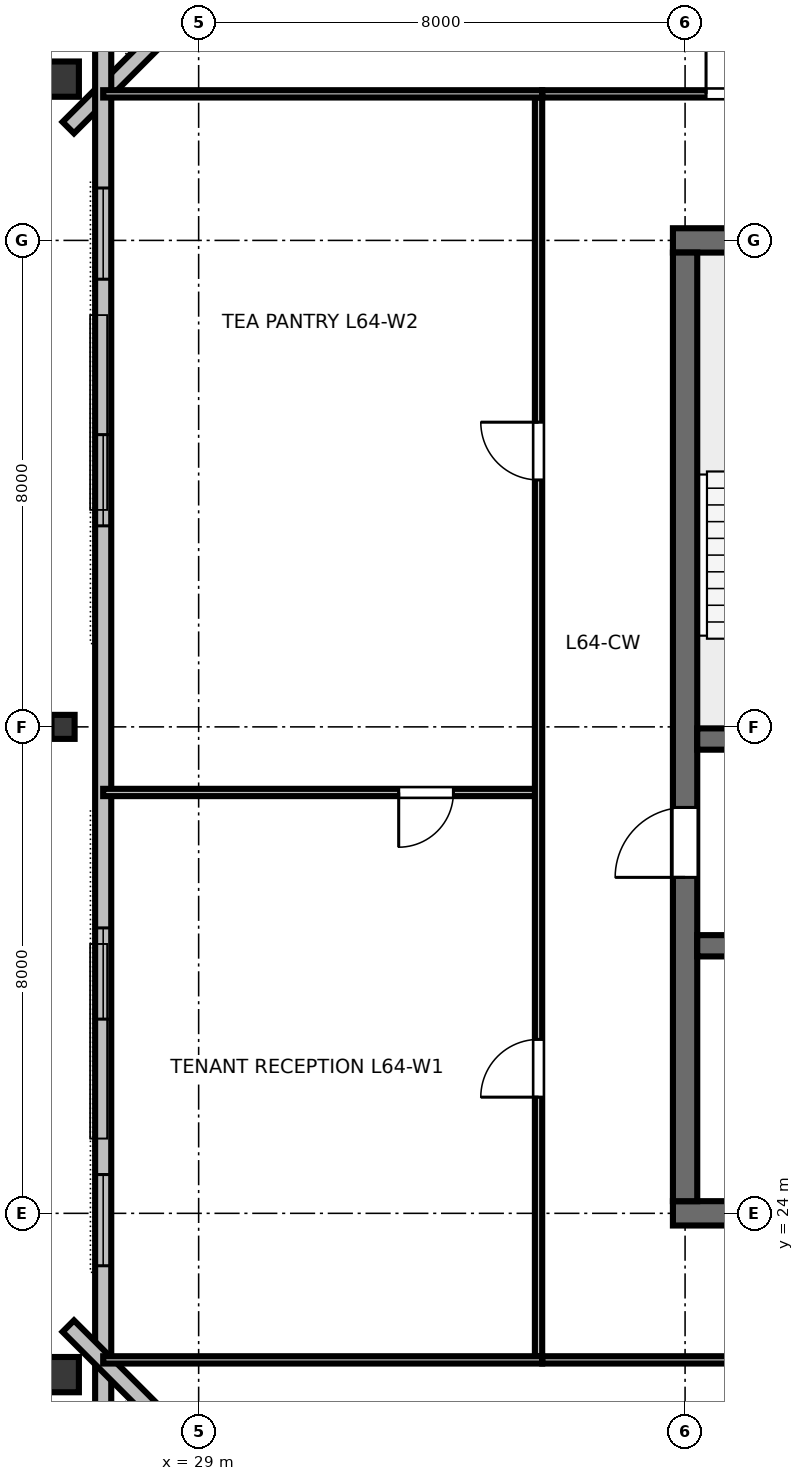
"""IFC4 building model, lengths in metres.
Left out: names, types, materials, properties, quantities, classifications, styles, units other than length and angle.
Written with IfcOpenShell. Run it as: python <this file> out.ifc"""

import sys

from ifc_helpers import new_model, si_unit, direction, frame, frame_2d, origin, origin_2d, place, context, subcontext, project, spatial, rectangle, hollow_rectangle, i_section, extrude, element, fill, save


model = new_model("IFC4")
c1 = context("Model", 3, precision=1e-05, world=origin(), true_north=direction((0.0, 1.0)))
c2 = subcontext(c1, "Body", "Model", "MODEL_VIEW")
j1 = project(units=[si_unit("LENGTHUNIT", "METRE"), si_unit("PLANEANGLEUNIT", "RADIAN")], contexts=[c1])
p1 = place(None, origin())
s1 = spatial("IfcSite", under=j1, at=p1, CompositionType="ELEMENT")
p2 = place(p1, origin())
s2 = spatial("IfcBuilding", under=s1, at=p2, CompositionType="ELEMENT")
p3 = place(p2, frame((0.0, 0.0, 243.0)))
s3 = spatial("IfcBuildingStorey", under=s2, at=p3, CompositionType="ELEMENT", Elevation=243.0)
p4 = place(p3, frame((36.8, 24.0, 0.0), z_axis=(0.0, 0.0, 1.0), x_axis=(1.0, 0.0, 0.0)))
e1 = element("IfcWall", 1, at=p4, inside=s3, PredefinedType="SHEAR", context=c2, shape_type="SweptSolid", body=[
    extrude(rectangle(XDim=18.4, YDim=0.4, at=frame_2d((9.2, 0.0))), origin(), (0.0, 0.0, 1.0), 3.36),
])
p5 = place(p4, frame((13.4, 0.0, 0.0)))
e2 = element("IfcOpeningElement", 2, at=p5, cuts=e1, PredefinedType="OPENING", context=c2, shape_type="SweptSolid", body=[
    extrude(rectangle(XDim=1.6, YDim=2.15, at=frame_2d((0.8, 1.075))), frame((0.0, 0.21, 0.0), z_axis=(0.0, -1.0, 0.0), x_axis=(1.0, 0.0, 0.0)), (0.0, 0.0, 1.0), 0.42),
])
p6 = place(p3, frame((36.8, 40.0, 0.0), z_axis=(0.0, 0.0, 1.0), x_axis=(1.0, 0.0, 0.0)))
e3 = element("IfcWall", 3, at=p6, inside=s3, PredefinedType="SHEAR", context=c2, shape_type="SweptSolid", body=[
    extrude(rectangle(XDim=18.4, YDim=0.4, at=frame_2d((9.2, 0.0))), origin(), (0.0, 0.0, 1.0), 3.36),
])
p7 = place(p6, frame((10.5, 0.0, 0.0)))
e4 = element("IfcOpeningElement", 4, at=p7, cuts=e3, PredefinedType="OPENING", context=c2, shape_type="SweptSolid", body=[
    extrude(rectangle(XDim=1.0, YDim=2.15, at=frame_2d((0.5, 1.075))), frame((0.0, 0.21, 0.0), z_axis=(0.0, -1.0, 0.0), x_axis=(1.0, 0.0, 0.0)), (0.0, 0.0, 1.0), 0.42),
])
p8 = place(p3, frame((37.0, 24.2, 0.0), z_axis=(0.0, 0.0, 1.0), x_axis=(0.0, 1.0, 0.0)))
e5 = element("IfcWall", 5, at=p8, inside=s3, PredefinedType="SHEAR", context=c2, shape_type="SweptSolid", body=[
    extrude(rectangle(XDim=15.6, YDim=0.4, at=frame_2d((7.8, 0.0))), origin(), (0.0, 0.0, 1.0), 3.36),
])
p9 = place(p8, frame((5.325, 0.0, 0.0)))
e6 = element("IfcOpeningElement", 6, at=p9, cuts=e5, PredefinedType="OPENING", context=c2, shape_type="SweptSolid", body=[
    extrude(rectangle(XDim=1.15, YDim=2.15, at=frame_2d((0.575, 1.075))), frame((0.0, 0.21, 0.0), z_axis=(0.0, -1.0, 0.0), x_axis=(1.0, 0.0, 0.0)), (0.0, 0.0, 1.0), 0.42),
])
p10 = place(p3, frame((37.2, 31.8, 0.0), z_axis=(0.0, 0.0, 1.0), x_axis=(1.0, 0.0, 0.0)))
e7 = element("IfcWall", 7, at=p10, inside=s3, PredefinedType="SHEAR", context=c2, shape_type="SweptSolid", body=[
    extrude(rectangle(XDim=17.6, YDim=0.35, at=frame_2d((8.8, 0.0))), origin(), (0.0, 0.0, 1.0), 3.36),
])
p11 = place(p10, frame((0.85, 0.0, 0.0)))
e8 = element("IfcOpeningElement", 8, at=p11, cuts=e7, PredefinedType="OPENING", context=c2, shape_type="SweptSolid", body=[
    extrude(rectangle(XDim=1.1, YDim=2.15, at=frame_2d((0.55, 1.075))), frame((0.0, 0.185, 0.0), z_axis=(0.0, -1.0, 0.0), x_axis=(1.0, 0.0, 0.0)), (0.0, 0.0, 1.0), 0.37),
])
p12 = place(p10, frame((14.75, 0.0, 0.0)))
e9 = element("IfcOpeningElement", 9, at=p12, cuts=e7, PredefinedType="OPENING", context=c2, shape_type="SweptSolid", body=[
    extrude(rectangle(XDim=1.1, YDim=2.15, at=frame_2d((0.55, 1.075))), frame((0.0, 0.185, 0.0), z_axis=(0.0, -1.0, 0.0), x_axis=(1.0, 0.0, 0.0)), (0.0, 0.0, 1.0), 0.37),
])
p13 = place(p3, frame((37.2, 28.4, 0.0), z_axis=(0.0, 0.0, 1.0), x_axis=(1.0, 0.0, 0.0)))
e10 = element("IfcWall", 10, at=p13, inside=s3, PredefinedType="SHEAR", context=c2, shape_type="SweptSolid", body=[
    extrude(rectangle(XDim=17.6, YDim=0.35, at=frame_2d((8.8, 0.0))), origin(), (0.0, 0.0, 1.0), 3.36),
])
p14 = place(p3, frame((26.68, 42.652, 0.0), z_axis=(0.0, 0.0, 1.0), x_axis=(0.0, 1.0, 0.0)))
e11 = element("IfcColumn", 11, at=p14, inside=s3, PredefinedType="COLUMN", context=c2, shape_type="SweptSolid", body=[
    extrude(hollow_rectangle(XDim=0.58, YDim=0.7, WallThickness=0.032, at=origin_2d()), origin(), (0.0, 0.0, 1.0), 3.373),
])
p15 = place(p3, frame((26.77, 32.0, 0.0), z_axis=(0.0, 0.0, 1.0), x_axis=(0.0, 1.0, 0.0)))
e12 = element("IfcColumn", 12, at=p15, inside=s3, PredefinedType="COLUMN", context=c2, shape_type="SweptSolid", body=[
    extrude(i_section(OverallWidth=0.395, OverallDepth=0.38, WebThickness=0.019, FlangeThickness=0.03, FilletRadius=0.025, at=origin_2d()), origin(), (0.0, 0.0, 1.0), 3.373),
])
p16 = place(p3, frame((26.68, 21.348, 0.0), z_axis=(0.0, 0.0, 1.0), x_axis=(0.0, 1.0, 0.0)))
e13 = element("IfcColumn", 13, at=p16, inside=s3, PredefinedType="COLUMN", context=c2, shape_type="SweptSolid", body=[
    extrude(hollow_rectangle(XDim=0.58, YDim=0.7, WallThickness=0.032, at=origin_2d()), origin(), (0.0, 0.0, 1.0), 3.373),
])
p17 = place(p3, frame((34.396, 49.394, 0.0), z_axis=(0.0, 0.0, 1.0), x_axis=(-0.707106781187, -0.707106781187, 0.0)))
e14 = element("IfcWall", 14, at=p17, inside=s3, PredefinedType="STANDARD", context=c2, shape_type="SweptSolid", body=[
    extrude(rectangle(XDim=10.662, YDim=0.265, at=frame_2d((5.331, 0.0))), origin(), (0.0, 0.0, 1.0), 3.375),
])
p18 = place(p3, frame((27.43, 43.24, 0.0), z_axis=(0.0, 0.0, 1.0), x_axis=(0.0, -1.0, 0.0)))
e15 = element("IfcWall", 15, at=p18, inside=s3, PredefinedType="STANDARD", context=c2, shape_type="SweptSolid", body=[
    extrude(rectangle(XDim=22.48, YDim=0.265, at=frame_2d((11.24, 0.0))), origin(), (0.0, 0.0, 1.0), 3.375),
])
p19 = place(p18, frame((2.378, 0.0, 0.85)))
e16 = element("IfcOpeningElement", 16, at=p19, cuts=e15, PredefinedType="OPENING", context=c2, shape_type="SweptSolid", body=[
    extrude(rectangle(XDim=1.5, YDim=1.85, at=frame_2d((0.75, 0.925))), frame((0.0, 0.142, 0.0), z_axis=(0.0, -1.0, 0.0), x_axis=(1.0, 0.0, 0.0)), (0.0, 0.0, 1.0), 0.285),
])
p20 = place(p18, frame((6.434, 0.0, 0.85)))
e17 = element("IfcOpeningElement", 17, at=p20, cuts=e15, PredefinedType="OPENING", context=c2, shape_type="SweptSolid", body=[
    extrude(rectangle(XDim=1.5, YDim=1.85, at=frame_2d((0.75, 0.925))), frame((0.0, 0.142, 0.0), z_axis=(0.0, -1.0, 0.0), x_axis=(1.0, 0.0, 0.0)), (0.0, 0.0, 1.0), 0.285),
])
p21 = place(p18, frame((14.546, 0.0, 0.85)))
e18 = element("IfcOpeningElement", 18, at=p21, cuts=e15, PredefinedType="OPENING", context=c2, shape_type="SweptSolid", body=[
    extrude(rectangle(XDim=1.5, YDim=1.85, at=frame_2d((0.75, 0.925))), frame((0.0, 0.142, 0.0), z_axis=(0.0, -1.0, 0.0), x_axis=(1.0, 0.0, 0.0)), (0.0, 0.0, 1.0), 0.285),
])
p22 = place(p18, frame((18.602, 0.0, 0.85)))
e19 = element("IfcOpeningElement", 19, at=p22, cuts=e15, PredefinedType="OPENING", context=c2, shape_type="SweptSolid", body=[
    extrude(rectangle(XDim=1.5, YDim=1.85, at=frame_2d((0.75, 0.925))), frame((0.0, 0.142, 0.0), z_axis=(0.0, -1.0, 0.0), x_axis=(1.0, 0.0, 0.0)), (0.0, 0.0, 1.0), 0.285),
])
p23 = place(p3, frame((26.856, 22.146, 0.0), z_axis=(0.0, 0.0, 1.0), x_axis=(0.707106781187, -0.707106781187, 0.0)))
e20 = element("IfcWall", 20, at=p23, inside=s3, PredefinedType="STANDARD", context=c2, shape_type="SweptSolid", body=[
    extrude(rectangle(XDim=10.662, YDim=0.265, at=frame_2d((5.331, 0.0))), origin(), (0.0, 0.0, 1.0), 3.375),
])
p24 = place(p3, frame((34.65, 21.59, 0.0), z_axis=(0.0, 0.0, 1.0), x_axis=(1.0, 0.0, 0.0)))
e21 = element("IfcWall", 21, at=p24, inside=s3, PredefinedType="PARTITIONING", context=c2, shape_type="SweptSolid", body=[
    extrude(rectangle(XDim=10.33, YDim=0.12, at=frame_2d((5.165, 0.0))), origin(), (0.0, 0.0, 1.0), 2.655),
])
p25 = place(p24, frame((3.55, 0.0, 0.0)))
e22 = element("IfcOpeningElement", 22, at=p25, cuts=e21, PredefinedType="OPENING", context=c2, shape_type="SweptSolid", body=[
    extrude(rectangle(XDim=0.95, YDim=2.15, at=frame_2d((0.475, 1.075))), frame((0.0, 0.07, 0.0), z_axis=(0.0, -1.0, 0.0), x_axis=(1.0, 0.0, 0.0)), (0.0, 0.0, 1.0), 0.14),
])
p26 = place(p24, frame((8.645, 0.0, 0.0)))
e23 = element("IfcOpeningElement", 23, at=p26, cuts=e21, PredefinedType="OPENING", context=c2, shape_type="SweptSolid", body=[
    extrude(rectangle(XDim=0.95, YDim=2.15, at=frame_2d((0.475, 1.075))), frame((0.0, 0.07, 0.0), z_axis=(0.0, -1.0, 0.0), x_axis=(1.0, 0.0, 0.0)), (0.0, 0.0, 1.0), 0.14),
])
p27 = place(p3, frame((34.65, 42.41, 0.0), z_axis=(0.0, 0.0, 1.0), x_axis=(1.0, 0.0, 0.0)))
e24 = element("IfcWall", 24, at=p27, inside=s3, PredefinedType="PARTITIONING", context=c2, shape_type="SweptSolid", body=[
    extrude(rectangle(XDim=10.33, YDim=0.12, at=frame_2d((5.165, 0.0))), origin(), (0.0, 0.0, 1.0), 2.655),
])
p28 = place(p27, frame((2.695, 0.0, 0.0)))
e25 = element("IfcOpeningElement", 25, at=p28, cuts=e24, PredefinedType="OPENING", context=c2, shape_type="SweptSolid", body=[
    extrude(rectangle(XDim=0.95, YDim=2.15, at=frame_2d((0.475, 1.075))), frame((0.0, 0.07, 0.0), z_axis=(0.0, -1.0, 0.0), x_axis=(1.0, 0.0, 0.0)), (0.0, 0.0, 1.0), 0.14),
])
p29 = place(p27, frame((7.79, 0.0, 0.0)))
e26 = element("IfcOpeningElement", 26, at=p29, cuts=e24, PredefinedType="OPENING", context=c2, shape_type="SweptSolid", body=[
    extrude(rectangle(XDim=0.95, YDim=2.15, at=frame_2d((0.475, 1.075))), frame((0.0, 0.07, 0.0), z_axis=(0.0, -1.0, 0.0), x_axis=(1.0, 0.0, 0.0)), (0.0, 0.0, 1.0), 0.14),
])
p30 = place(p3, frame((34.59, 30.921, 0.0), z_axis=(0.0, 0.0, 1.0), x_axis=(-1.0, 0.0, 0.0)))
e27 = element("IfcWall", 27, at=p30, inside=s3, PredefinedType="PARTITIONING", context=c2, shape_type="SweptSolid", body=[
    extrude(rectangle(XDim=7.16, YDim=0.12, at=frame_2d((3.58, 0.0))), origin(), (0.0, 0.0, 1.0), 2.655),
])
p31 = place(p30, frame((1.4, 0.0, 0.0)))
e28 = element("IfcOpeningElement", 28, at=p31, cuts=e27, PredefinedType="OPENING", context=c2, shape_type="SweptSolid", body=[
    extrude(rectangle(XDim=0.9, YDim=2.15, at=frame_2d((0.45, 1.075))), frame((0.0, 0.07, 0.0), z_axis=(0.0, -1.0, 0.0), x_axis=(1.0, 0.0, 0.0)), (0.0, 0.0, 1.0), 0.14),
])
p32 = place(p3, frame((34.59, 21.65, 0.0), z_axis=(0.0, 0.0, 1.0), x_axis=(0.0, 1.0, 0.0)))
e29 = element("IfcWall", 29, at=p32, inside=s3, PredefinedType="PARTITIONING", context=c2, shape_type="SweptSolid", body=[
    extrude(rectangle(XDim=20.7, YDim=0.12, at=frame_2d((10.35, 0.0))), origin(), (0.0, 0.0, 1.0), 2.655),
])
p33 = place(p32, frame((4.26, 0.0, 0.0)))
e30 = element("IfcOpeningElement", 30, at=p33, cuts=e29, PredefinedType="OPENING", context=c2, shape_type="SweptSolid", body=[
    extrude(rectangle(XDim=0.95, YDim=2.15, at=frame_2d((0.475, 1.075))), frame((0.0, 0.07, 0.0), z_axis=(0.0, -1.0, 0.0), x_axis=(1.0, 0.0, 0.0)), (0.0, 0.0, 1.0), 0.14),
])
p34 = place(p32, frame((14.411, 0.0, 0.0)))
e31 = element("IfcOpeningElement", 31, at=p34, cuts=e29, PredefinedType="OPENING", context=c2, shape_type="SweptSolid", body=[
    extrude(rectangle(XDim=0.95, YDim=2.15, at=frame_2d((0.475, 1.075))), frame((0.0, 0.07, 0.0), z_axis=(0.0, -1.0, 0.0), x_axis=(1.0, 0.0, 0.0)), (0.0, 0.0, 1.0), 0.14),
])
for number, where, z_axis, x_axis in (
    (32, (34.65, 21.59, 0.0), (0.0, 0.0, 1.0), (-1.0, 0.0, 0.0)),
    (33, (34.65, 42.41, 0.0), (0.0, 0.0, 1.0), (-1.0, 0.0, 0.0)),
):
    element("IfcWall", number, at=place(p3, frame(where, z_axis=z_axis, x_axis=x_axis)), inside=s3, PredefinedType="PARTITIONING", context=c2, shape_type="SweptSolid", body=[
        extrude(rectangle(XDim=7.22, YDim=0.12, at=frame_2d((3.61, 0.0))), origin(), (0.0, 0.0, 1.0), 2.655),
    ])
p35 = place(p19, origin())
e34 = element("IfcWindow", 34, at=p35, inside=s3, PartitioningType="SINGLE_PANEL", PredefinedType="WINDOW", context=c2, shape_type="SweptSolid", body=[
    extrude(rectangle(XDim=1.5, YDim=1.85, at=frame_2d((0.75, 0.925))), frame((0.0, 0.03, 0.0), z_axis=(0.0, -1.0, 0.0), x_axis=(1.0, 0.0, 0.0)), (0.0, 0.0, 1.0), 0.06),
])
fill(e16, e34)
p36 = place(p20, origin())
e35 = element("IfcWindow", 35, at=p36, inside=s3, PartitioningType="SINGLE_PANEL", PredefinedType="WINDOW", context=c2, shape_type="SweptSolid", body=[
    extrude(rectangle(XDim=1.5, YDim=1.85, at=frame_2d((0.75, 0.925))), frame((0.0, 0.03, 0.0), z_axis=(0.0, -1.0, 0.0), x_axis=(1.0, 0.0, 0.0)), (0.0, 0.0, 1.0), 0.06),
])
fill(e17, e35)
p37 = place(p21, origin())
e36 = element("IfcWindow", 36, at=p37, inside=s3, PartitioningType="SINGLE_PANEL", PredefinedType="WINDOW", context=c2, shape_type="SweptSolid", body=[
    extrude(rectangle(XDim=1.5, YDim=1.85, at=frame_2d((0.75, 0.925))), frame((0.0, 0.03, 0.0), z_axis=(0.0, -1.0, 0.0), x_axis=(1.0, 0.0, 0.0)), (0.0, 0.0, 1.0), 0.06),
])
fill(e18, e36)
p38 = place(p22, origin())
e37 = element("IfcWindow", 37, at=p38, inside=s3, PartitioningType="SINGLE_PANEL", PredefinedType="WINDOW", context=c2, shape_type="SweptSolid", body=[
    extrude(rectangle(XDim=1.5, YDim=1.85, at=frame_2d((0.75, 0.925))), frame((0.0, 0.03, 0.0), z_axis=(0.0, -1.0, 0.0), x_axis=(1.0, 0.0, 0.0)), (0.0, 0.0, 1.0), 0.06),
])
fill(e19, e37)
p39 = place(p9, origin())
e38 = element("IfcDoor", 38, at=p39, inside=s3, OperationType="SINGLE_SWING_LEFT", PredefinedType="DOOR", context=c2, shape_type="SweptSolid", body=[
    extrude(rectangle(XDim=1.15, YDim=2.15, at=frame_2d((0.575, 1.075))), frame((0.0, 0.025, 0.0), z_axis=(0.0, -1.0, 0.0), x_axis=(1.0, 0.0, 0.0)), (0.0, 0.0, 1.0), 0.05),
])
fill(e6, e38)
p40 = place(p28, origin())
e39 = element("IfcDoor", 39, at=p40, inside=s3, OperationType="SINGLE_SWING_LEFT", PredefinedType="DOOR", context=c2, shape_type="SweptSolid", body=[
    extrude(rectangle(XDim=0.95, YDim=2.15, at=frame_2d((0.475, 1.075))), frame((0.0, 0.025, 0.0), z_axis=(0.0, -1.0, 0.0), x_axis=(1.0, 0.0, 0.0)), (0.0, 0.0, 1.0), 0.05),
])
fill(e25, e39)
p41 = place(p31, origin())
e40 = element("IfcDoor", 40, at=p41, inside=s3, OperationType="SINGLE_SWING_RIGHT", PredefinedType="DOOR", context=c2, shape_type="SweptSolid", body=[
    extrude(rectangle(XDim=0.9, YDim=2.15, at=frame_2d((0.45, 1.075))), frame((0.0, 0.025, 0.0), z_axis=(0.0, -1.0, 0.0), x_axis=(1.0, 0.0, 0.0)), (0.0, 0.0, 1.0), 0.05),
])
fill(e28, e40)
p42 = place(p33, origin())
e41 = element("IfcDoor", 41, at=p42, inside=s3, OperationType="SINGLE_SWING_LEFT", PredefinedType="DOOR", context=c2, shape_type="SweptSolid", body=[
    extrude(rectangle(XDim=0.95, YDim=2.15, at=frame_2d((0.475, 1.075))), frame((0.0, 0.025, 0.0), z_axis=(0.0, -1.0, 0.0), x_axis=(1.0, 0.0, 0.0)), (0.0, 0.0, 1.0), 0.05),
])
fill(e30, e41)
p43 = place(p34, origin())
e42 = element("IfcDoor", 42, at=p43, inside=s3, OperationType="SINGLE_SWING_RIGHT", PredefinedType="DOOR", context=c2, shape_type="SweptSolid", body=[
    extrude(rectangle(XDim=0.95, YDim=2.15, at=frame_2d((0.475, 1.075))), frame((0.0, 0.025, 0.0), z_axis=(0.0, -1.0, 0.0), x_axis=(1.0, 0.0, 0.0)), (0.0, 0.0, 1.0), 0.05),
])
fill(e31, e42)
save(model, sys.argv[1])
